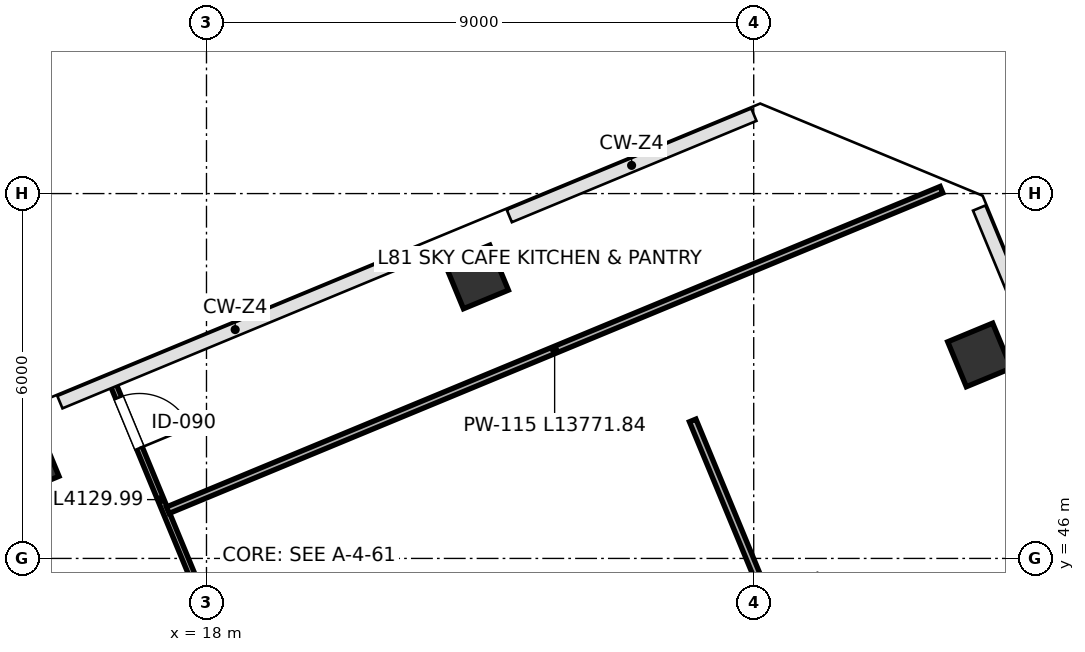
"""IFC4 building model, lengths in metres.
Left out: names, types, materials, properties, quantities, classifications, styles, units other than length and angle.
Written with IfcOpenShell. Run it as: python <this file> out.ifc"""

import sys

from ifc_helpers import new_model, si_unit, direction, frame, frame_2d, origin, origin_2d, place, context, subcontext, project, spatial, rectangle, extrude, source, transform, mapped, element, fill, save


model = new_model("IFC4")
c1 = context("Model", 3, precision=1e-05, world=origin(), true_north=direction((0.0, 1.0)))
c2 = subcontext(c1, "Body", "Model", "MODEL_VIEW")
j1 = project(units=[si_unit("LENGTHUNIT", "METRE"), si_unit("PLANEANGLEUNIT", "RADIAN")], contexts=[c1])
p1 = place(None, origin())
s1 = spatial("IfcSite", under=j1, at=p1, CompositionType="ELEMENT")
p2 = place(p1, origin())
s2 = spatial("IfcBuilding", under=s1, at=p2, CompositionType="ELEMENT")
p3 = place(p2, frame((0.0, 0.0, 360.0)))
s3 = spatial("IfcBuildingStorey", under=s2, at=p3, CompositionType="ELEMENT", Elevation=360.0)
m1 = source(origin(), c2, "Body", "SweptSolid", [
    extrude(rectangle(XDim=0.8, YDim=0.8, at=origin_2d()), origin(), (0.0, 0.0, 1.0), 5.699),
])
for number, where, z_axis, x_axis in (
    (1, (30.713, 49.346, 0.001), (0.0, 0.0, 1.0), (-0.383, 0.924, 0.0)),
    (2, (15.052, 47.567, 0.001), (0.0, 0.0, 1.0), (-0.383, 0.924, 0.0)),
    (3, (22.443, 50.629, 0.001), (0.0, 0.0, 1.0), (-0.383, 0.924, 0.0)),
):
    element("IfcColumn", number, at=place(p3, frame(where, z_axis=z_axis, x_axis=x_axis)), inside=s3, PredefinedType="COLUMN", context=c2, shape_type="MappedRepresentation", body=[
        mapped(m1, transform((0.0, 0.0, 0.0), scale=1.0)),
    ])
p4 = place(p3, frame((25.996, 48.269, 0.0), z_axis=(0.0, 0.0, 1.0), x_axis=(0.382683927115, -0.923879327579, 0.0)))
e4 = element("IfcWall", 4, at=p4, inside=s3, PredefinedType="PARTITIONING", context=c2, shape_type="SweptSolid", body=[
    extrude(rectangle(XDim=10.82, YDim=0.115, at=frame_2d((5.41, 0.0))), origin(), (0.0, 0.0, 1.0), 5.72),
])
p5 = place(p4, frame((3.1, 0.0, 0.0)))
e5 = element("IfcOpeningElement", 5, at=p5, cuts=e4, PredefinedType="OPENING", context=c2, shape_type="SweptSolid", body=[
    extrude(rectangle(XDim=0.95, YDim=2.15, at=frame_2d((0.475, 1.075))), frame((0.0, 0.067, 0.0), z_axis=(0.0, -1.0, 0.0), x_axis=(1.0, 0.0, 0.0)), (0.0, 0.0, 1.0), 0.135),
])
p6 = place(p3, frame((16.458, 48.875, 0.0), z_axis=(0.0, 0.0, 1.0), x_axis=(0.382645903769, -0.923895076472, 0.0)))
e6 = element("IfcWall", 6, at=p6, inside=s3, PredefinedType="PARTITIONING", context=c2, shape_type="SweptSolid", body=[
    extrude(rectangle(XDim=4.13, YDim=0.1, at=frame_2d((2.065, 0.0))), origin(), (0.0, 0.0, 1.0), 5.055),
])
p7 = place(p6, frame((0.25, 0.0, 0.0)))
e7 = element("IfcOpeningElement", 7, at=p7, cuts=e6, PredefinedType="OPENING", context=c2, shape_type="SweptSolid", body=[
    extrude(rectangle(XDim=0.9, YDim=2.15, at=frame_2d((0.45, 1.075))), frame((0.0, 0.06, 0.0), z_axis=(0.0, -1.0, 0.0), x_axis=(1.0, 0.0, 0.0)), (0.0, 0.0, 1.0), 0.12),
])
p8 = place(p3, frame((17.364, 46.793, 0.0), z_axis=(0.0, 0.0, 1.0), x_axis=(0.923874230192, 0.382696233045, 0.0)))
e8 = element("IfcWall", 8, at=p8, inside=s3, PredefinedType="PARTITIONING", context=c2, shape_type="SweptSolid", body=[
    extrude(rectangle(XDim=13.772, YDim=0.115, at=frame_2d((6.886, 0.0))), origin(), (0.0, 0.0, 1.0), 5.72),
])
m2 = source(origin(), c2, "Body", "SweptSolid", [
    extrude(rectangle(XDim=0.9, YDim=2.15, at=frame_2d((0.45, 1.075))), frame((0.0, 0.025, 0.0), z_axis=(0.0, -1.0, 0.0), x_axis=(1.0, 0.0, 0.0)), (0.0, 0.0, 1.0), 0.05),
])
p9 = place(p7, origin())
e9 = element("IfcDoor", 9, at=p9, inside=s3, OperationType="SINGLE_SWING_RIGHT", PredefinedType="DOOR", context=c2, shape_type="MappedRepresentation", body=[
    mapped(m2, transform((0.0, 0.0, 0.0), scale=1.0)),
])
fill(e7, e9)
save(model, sys.argv[1])
